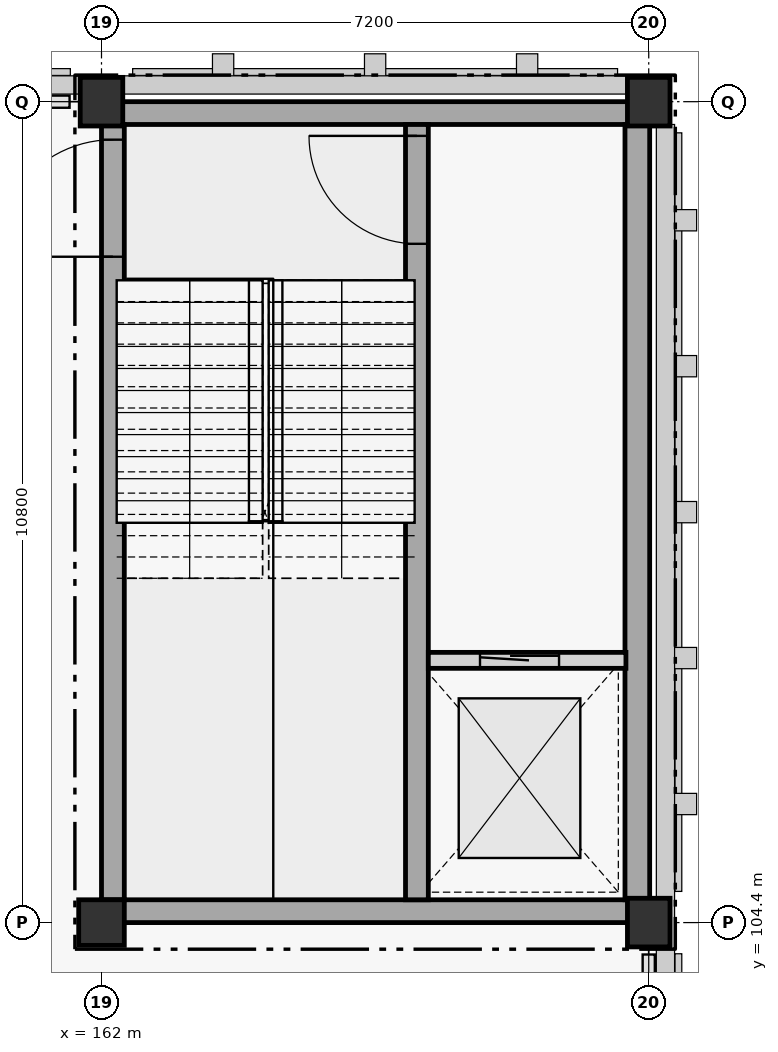
"""IFC4 building model, lengths in metres.
Left out: names, types, materials, properties, quantities, classifications, styles, units other than length and angle.
Written with IfcOpenShell. Run it as: python <this file> out.ifc"""

import sys

from ifc_helpers import new_model, si_unit, direction, frame, frame_2d, origin, origin_2d, place, context, subcontext, project, spatial, rectangle, extrude, element, fill, save


model = new_model("IFC4")
c1 = context("Model", 3, precision=1e-05, world=origin(), true_north=direction((0.0, 1.0)))
c2 = subcontext(c1, "Body", "Model", "MODEL_VIEW")
j1 = project(units=[si_unit("LENGTHUNIT", "METRE"), si_unit("PLANEANGLEUNIT", "RADIAN")], contexts=[c1])
p1 = place(None, origin())
s1 = spatial("IfcSite", under=j1, at=p1, CompositionType="ELEMENT")
p2 = place(p1, origin())
s2 = spatial("IfcBuilding", under=s1, at=p2, CompositionType="ELEMENT")
p3 = place(p2, frame((0.0, 0.0, 10.8)))
s3 = spatial("IfcBuildingStorey", under=s2, at=p3, CompositionType="ELEMENT", Elevation=10.8)
p4 = place(p3, frame((162.0, 104.4, 0.0), z_axis=(0.0, 0.0, 1.0), x_axis=(1.0, 0.0, 0.0)))
e1 = element("IfcColumn", 1, at=p4, inside=s3, PredefinedType="COLUMN", context=c2, shape_type="SweptSolid", body=[
    extrude(rectangle(XDim=0.6, YDim=0.6, at=origin_2d()), origin(), (0.0, 0.0, 1.0), 4.2),
])
for number, where, z_axis, x_axis in (
    (2, (162.0, 115.2, 0.0), (0.0, 0.0, 1.0), (1.0, 0.0, 0.0)),
    (3, (169.2, 104.4, 0.0), (0.0, 0.0, 1.0), (1.0, 0.0, 0.0)),
    (4, (169.2, 115.2, 0.0), (0.0, 0.0, 1.0), (1.0, 0.0, 0.0)),
):
    element("IfcColumn", number, at=place(p3, frame(where, z_axis=z_axis, x_axis=x_axis)), inside=s3, PredefinedType="COLUMN", context=c2, shape_type="SweptSolid", body=[
        extrude(rectangle(XDim=0.56, YDim=0.64, at=origin_2d()), origin(), (0.0, 0.0, 1.0), 4.2),
    ])
for number, where, z_axis, x_axis in (
    (5, (169.2, 104.55, 0.0), (0.0, 0.0, 1.0), (-1.0, 0.0, 0.0)),
    (6, (162.0, 115.05, 0.0), (0.0, 0.0, 1.0), (1.0, 0.0, 0.0)),
):
    element("IfcWall", number, at=place(p3, frame(where, z_axis=z_axis, x_axis=x_axis)), inside=s3, PredefinedType="SHEAR", context=c2, shape_type="SweptSolid", body=[
        extrude(rectangle(XDim=7.2, YDim=0.3, at=frame_2d((3.6, 0.0))), origin(), (0.0, 0.0, 1.0), 4.2),
    ])
p5 = place(p3, frame((162.15, 104.7, 0.0), z_axis=(0.0, 0.0, 1.0), x_axis=(0.0, 1.0, 0.0)))
e7 = element("IfcWall", 7, at=p5, inside=s3, PredefinedType="SHEAR", context=c2, shape_type="SweptSolid", body=[
    extrude(rectangle(XDim=10.2, YDim=0.3, at=frame_2d((5.1, 0.0))), origin(), (0.0, 0.0, 1.0), 4.2),
])
p6 = place(p5, frame((8.46, 0.0, 0.0)))
e8 = element("IfcOpeningElement", 8, at=p6, cuts=e7, PredefinedType="OPENING", context=c2, shape_type="SweptSolid", body=[
    extrude(rectangle(XDim=1.54, YDim=2.22, at=frame_2d((0.77, 1.11))), frame((0.0, 0.15, 0.0), z_axis=(0.0, -1.0, 0.0), x_axis=(1.0, 0.0, 0.0)), (0.0, 0.0, 1.0), 0.3),
])
p7 = place(p3, frame((169.05, 114.9, 0.0), z_axis=(0.0, 0.0, 1.0), x_axis=(0.0, -1.0, 0.0)))
e9 = element("IfcWall", 9, at=p7, inside=s3, PredefinedType="SHEAR", context=c2, shape_type="SweptSolid", body=[
    extrude(rectangle(XDim=10.2, YDim=0.325, at=frame_2d((5.1, 0.0))), origin(), (0.0, 0.0, 1.0), 4.2),
])
p8 = place(p3, frame((166.15, 104.7, 0.0), z_axis=(0.0, 0.0, 1.0), x_axis=(0.0, 1.0, 0.0)))
e10 = element("IfcWall", 10, at=p8, inside=s3, PredefinedType="SHEAR", context=c2, shape_type="SweptSolid", body=[
    extrude(rectangle(XDim=10.2, YDim=0.3, at=frame_2d((5.1, 0.0))), origin(), (0.0, 0.0, 1.0), 4.2),
])
p9 = place(p8, frame((8.63, 0.0, 0.0)))
e11 = element("IfcOpeningElement", 11, at=p9, cuts=e10, PredefinedType="OPENING", context=c2, shape_type="SweptSolid", body=[
    extrude(rectangle(XDim=1.42, YDim=2.2, at=frame_2d((0.71, 1.1))), frame((0.0, 0.15, 0.0), z_axis=(0.0, -1.0, 0.0), x_axis=(1.0, 0.0, 0.0)), (0.0, 0.0, 1.0), 0.3),
])
p10 = place(p3, frame((166.3, 107.85, 0.0), z_axis=(0.0, 0.0, 1.0), x_axis=(1.0, 0.0, 0.0)))
e12 = element("IfcWall", 12, at=p10, inside=s3, PredefinedType="STANDARD", context=c2, shape_type="SweptSolid", body=[
    extrude(rectangle(XDim=2.6, YDim=0.21, at=frame_2d((1.3, 0.0))), origin(), (0.0, 0.0, 1.0), 4.2),
])
p11 = place(p10, frame((0.68, 0.0, 0.0)))
e13 = element("IfcOpeningElement", 13, at=p11, cuts=e12, PredefinedType="OPENING", context=c2, shape_type="SweptSolid", body=[
    extrude(rectangle(XDim=1.04, YDim=2.16, at=frame_2d((0.52, 1.08))), frame((0.0, 0.105, 0.0), z_axis=(0.0, -1.0, 0.0), x_axis=(1.0, 0.0, 0.0)), (0.0, 0.0, 1.0), 0.21),
])
p12 = place(p11, origin())
e14 = element("IfcDoor", 14, at=p12, inside=s3, OperationType="SLIDING_TO_LEFT", PredefinedType="DOOR", context=c2, shape_type="SweptSolid", body=[
    extrude(rectangle(XDim=1.04, YDim=2.16, at=frame_2d((0.52, 1.08))), frame((0.0, 0.025, 0.0), z_axis=(0.0, -1.0, 0.0), x_axis=(1.0, 0.0, 0.0)), (0.0, 0.0, 1.0), 0.05),
])
fill(e13, e14)
p13 = place(p9, origin())
e15 = element("IfcDoor", 15, at=p13, inside=s3, OperationType="SINGLE_SWING_RIGHT", PredefinedType="DOOR", context=c2, shape_type="SweptSolid", body=[
    extrude(rectangle(XDim=1.42, YDim=2.2, at=frame_2d((0.71, 1.1))), frame((0.0, 0.025, 0.0), z_axis=(0.0, -1.0, 0.0), x_axis=(1.0, 0.0, 0.0)), (0.0, 0.0, 1.0), 0.05),
])
fill(e11, e15)
p14 = place(p6, origin())
e16 = element("IfcDoor", 16, at=p14, inside=s3, OperationType="SINGLE_SWING_LEFT", PredefinedType="DOOR", context=c2, shape_type="SweptSolid", body=[
    extrude(rectangle(XDim=1.54, YDim=2.22, at=frame_2d((0.77, 1.11))), frame((0.0, 0.025, 0.0), z_axis=(0.0, -1.0, 0.0), x_axis=(1.0, 0.0, 0.0)), (0.0, 0.0, 1.0), 0.05),
])
fill(e8, e16)
save(model, sys.argv[1])
